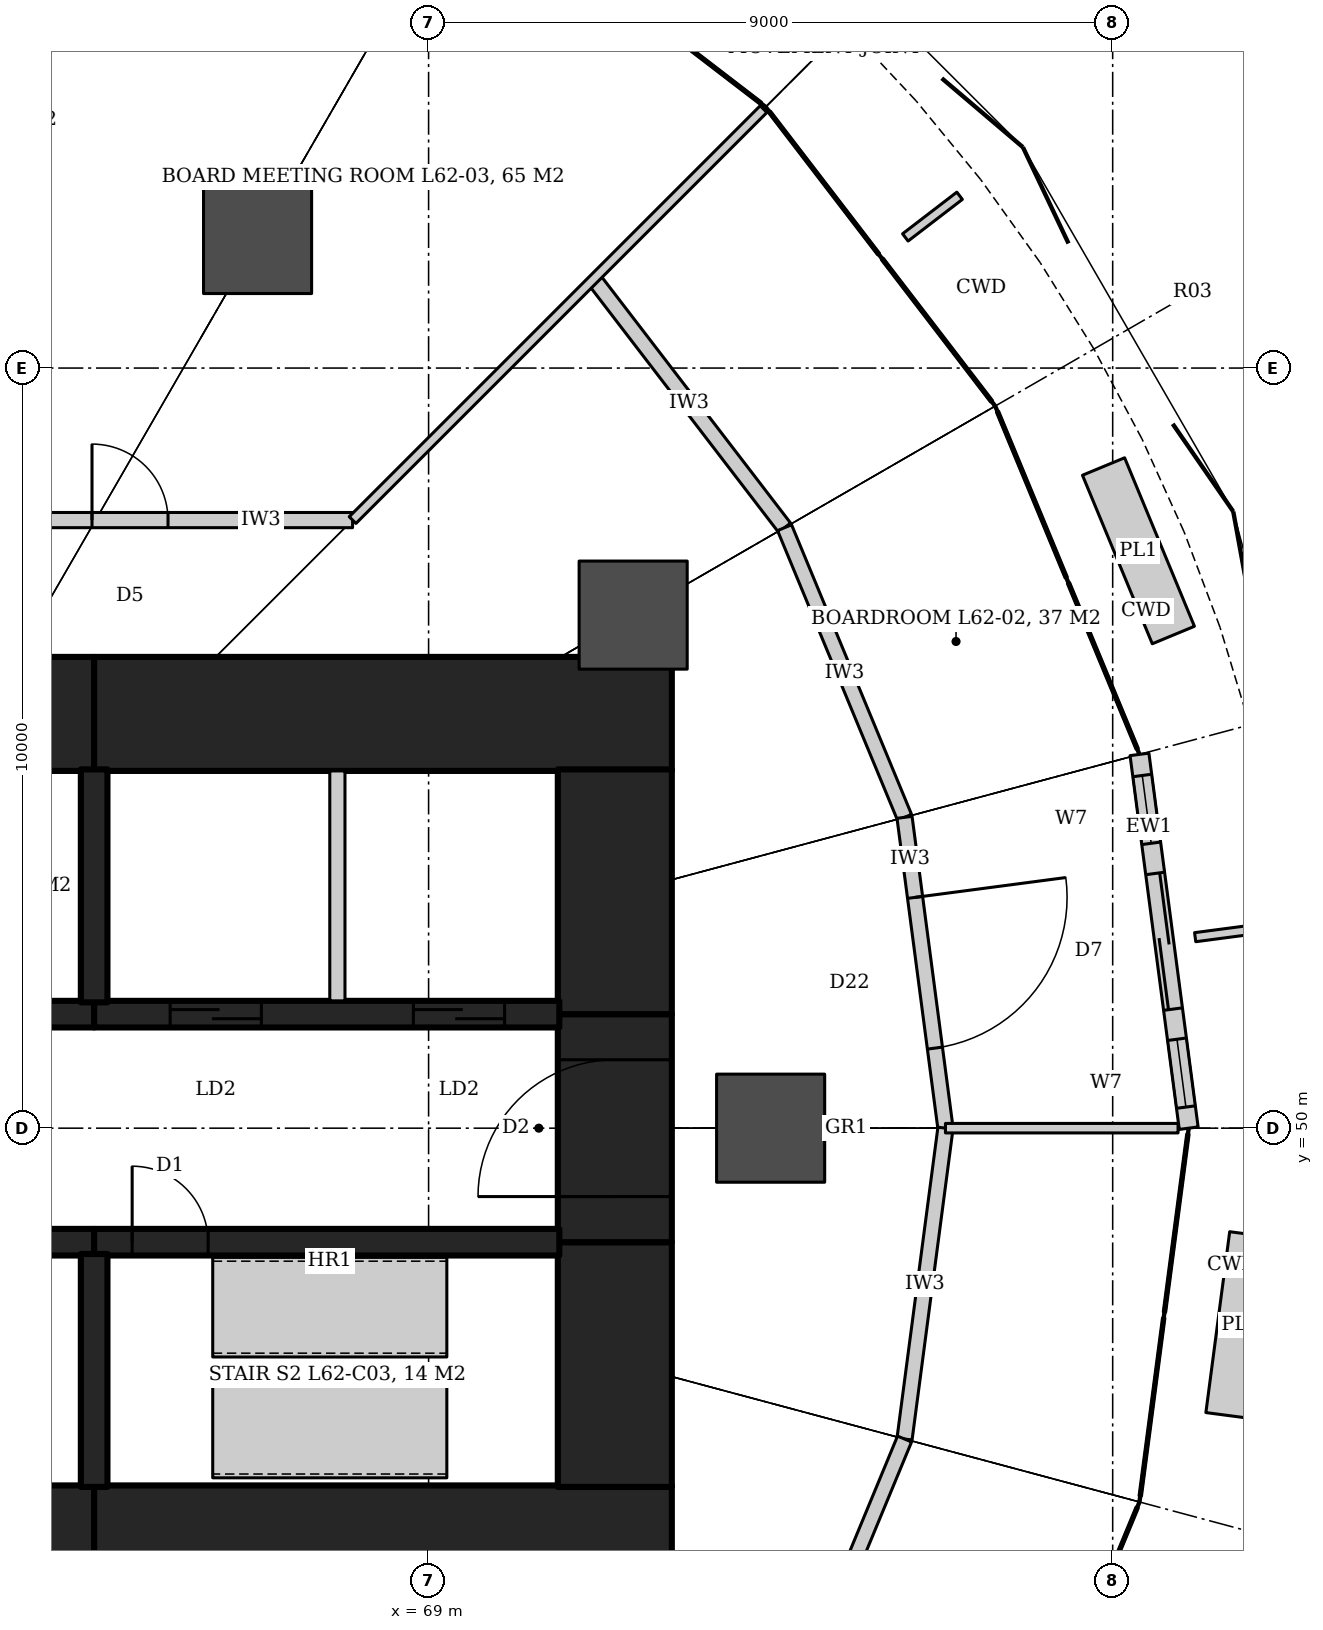
"""IFC4 building model, lengths in metres.
Left out: names, types, materials, properties, quantities, classifications, styles, units other than length and angle.
Written with IfcOpenShell. Run it as: python <this file> out.ifc"""

import sys

from ifc_helpers import new_model, si_unit, direction, frame, frame_2d, origin, origin_2d, place, context, subcontext, project, spatial, rectangle, hollow_circle, extrude, element, fill, save


model = new_model("IFC4")
c1 = context("Model", 3, precision=1e-05, world=origin(), true_north=direction((0.0, 1.0)))
c2 = subcontext(c1, "Body", "Model", "MODEL_VIEW")
j1 = project(units=[si_unit("LENGTHUNIT", "METRE"), si_unit("PLANEANGLEUNIT", "RADIAN")], contexts=[c1])
p1 = place(None, origin())
s1 = spatial("IfcSite", under=j1, at=p1, CompositionType="ELEMENT")
p2 = place(p1, origin())
s2 = spatial("IfcBuilding", under=s1, at=p2, CompositionType="ELEMENT")
p3 = place(p2, frame((0.0, 0.0, 269.6)))
s3 = spatial("IfcBuildingStorey", under=s2, at=p3, CompositionType="ELEMENT", Elevation=269.6)
p4 = place(p3, frame((55.4, 55.45, 0.0), z_axis=(0.0, 0.0, 1.0), x_axis=(1.0, 0.0, 0.0)))
e1 = element("IfcWall", 1, at=p4, inside=s3, PredefinedType="SHEAR", context=c2, shape_type="SweptSolid", body=[
    extrude(rectangle(XDim=9.2, YDim=1.5, at=frame_2d((4.6, 0.0))), origin(), (0.0, 0.0, 1.0), 4.2),
])
p5 = place(p3, frame((64.6, 55.45, 0.0), z_axis=(0.0, 0.0, 1.0), x_axis=(1.0, 0.0, 0.0)))
e2 = element("IfcWall", 2, at=p5, inside=s3, PredefinedType="SHEAR", context=c2, shape_type="SweptSolid", body=[
    extrude(rectangle(XDim=7.6, YDim=1.5, at=frame_2d((3.8, 0.0))), origin(), (0.0, 0.0, 1.0), 4.2),
])
p6 = place(p3, frame((55.4, 44.55, 0.0), z_axis=(0.0, 0.0, 1.0), x_axis=(1.0, 0.0, 0.0)))
e3 = element("IfcWall", 3, at=p6, inside=s3, PredefinedType="SHEAR", context=c2, shape_type="SweptSolid", body=[
    extrude(rectangle(XDim=9.2, YDim=1.5, at=frame_2d((4.6, 0.0))), origin(), (0.0, 0.0, 1.0), 4.2),
])
p7 = place(p3, frame((64.6, 44.55, 0.0), z_axis=(0.0, 0.0, 1.0), x_axis=(1.0, 0.0, 0.0)))
e4 = element("IfcWall", 4, at=p7, inside=s3, PredefinedType="SHEAR", context=c2, shape_type="SweptSolid", body=[
    extrude(rectangle(XDim=7.6, YDim=1.5, at=frame_2d((3.8, 0.0))), origin(), (0.0, 0.0, 1.0), 4.2),
])
p8 = place(p3, frame((71.45, 45.28, 0.0), z_axis=(0.0, 0.0, 1.0), x_axis=(0.0, 1.0, 0.0)))
e5 = element("IfcWall", 5, at=p8, inside=s3, PredefinedType="SHEAR", context=c2, shape_type="SweptSolid", body=[
    extrude(rectangle(XDim=3.22, YDim=1.5, at=frame_2d((1.61, 0.0))), origin(), (0.0, 0.0, 1.0), 4.2),
])
p9 = place(p3, frame((71.45, 48.5, 0.0), z_axis=(0.0, 0.0, 1.0), x_axis=(0.0, 1.0, 0.0)))
e6 = element("IfcWall", 6, at=p9, inside=s3, PredefinedType="SHEAR", context=c2, shape_type="SweptSolid", body=[
    extrude(rectangle(XDim=3.0, YDim=1.5, at=frame_2d((1.5, 0.0))), origin(), (0.0, 0.0, 1.0), 4.2),
])
p10 = place(p9, frame((0.6, 0.0, 0.0)))
e7 = element("IfcOpeningElement", 7, at=p10, cuts=e6, PredefinedType="OPENING", context=c2, shape_type="SweptSolid", body=[
    extrude(rectangle(XDim=1.8, YDim=2.1, at=frame_2d((0.9, 1.05))), frame((0.0, 0.76, 0.0), z_axis=(0.0, -1.0, 0.0), x_axis=(1.0, 0.0, 0.0)), (0.0, 0.0, 1.0), 1.52),
])
p11 = place(p3, frame((71.45, 51.5, 0.0), z_axis=(0.0, 0.0, 1.0), x_axis=(0.0, 1.0, 0.0)))
e8 = element("IfcWall", 8, at=p11, inside=s3, PredefinedType="SHEAR", context=c2, shape_type="SweptSolid", body=[
    extrude(rectangle(XDim=3.22, YDim=1.5, at=frame_2d((1.61, 0.0))), origin(), (0.0, 0.0, 1.0), 4.2),
])
p12 = place(p3, frame((55.4, 51.5, 0.0), z_axis=(0.0, 0.0, 1.0), x_axis=(1.0, 0.0, 0.0)))
e9 = element("IfcWall", 9, at=p12, inside=s3, PredefinedType="SHEAR", context=c2, shape_type="SweptSolid", body=[
    extrude(rectangle(XDim=9.2, YDim=0.35, at=frame_2d((4.6, 0.0))), origin(), (0.0, 0.0, 1.0), 4.2),
])
p13 = place(p12, frame((1.585, 0.0, 0.0)))
e10 = element("IfcOpeningElement", 10, at=p13, cuts=e9, PredefinedType="OPENING", context=c2, shape_type="SweptSolid", body=[
    extrude(rectangle(XDim=0.8, YDim=2.1, at=frame_2d((0.4, 1.05))), frame((0.0, 0.185, 0.0), z_axis=(0.0, -1.0, 0.0), x_axis=(1.0, 0.0, 0.0)), (0.0, 0.0, 1.0), 0.37),
])
p14 = place(p12, frame((4.703, 0.0, 0.0)))
e11 = element("IfcOpeningElement", 11, at=p14, cuts=e9, PredefinedType="OPENING", context=c2, shape_type="SweptSolid", body=[
    extrude(rectangle(XDim=0.8, YDim=2.1, at=frame_2d((0.4, 1.05))), frame((0.0, 0.185, 0.0), z_axis=(0.0, -1.0, 0.0), x_axis=(1.0, 0.0, 0.0)), (0.0, 0.0, 1.0), 0.37),
])
p15 = place(p12, frame((7.318, 0.0, 0.0)))
e12 = element("IfcOpeningElement", 12, at=p15, cuts=e9, PredefinedType="OPENING", context=c2, shape_type="SweptSolid", body=[
    extrude(rectangle(XDim=0.8, YDim=2.1, at=frame_2d((0.4, 1.05))), frame((0.0, 0.185, 0.0), z_axis=(0.0, -1.0, 0.0), x_axis=(1.0, 0.0, 0.0)), (0.0, 0.0, 1.0), 0.37),
])
p16 = place(p3, frame((64.6, 51.5, 0.0), z_axis=(0.0, 0.0, 1.0), x_axis=(1.0, 0.0, 0.0)))
e13 = element("IfcWall", 13, at=p16, inside=s3, PredefinedType="SHEAR", context=c2, shape_type="SweptSolid", body=[
    extrude(rectangle(XDim=6.12, YDim=0.35, at=frame_2d((3.06, 0.0))), origin(), (0.0, 0.0, 1.0), 4.2),
])
p17 = place(p16, frame((1.0, 0.0, 0.0)))
e14 = element("IfcOpeningElement", 14, at=p17, cuts=e13, PredefinedType="OPENING", context=c2, shape_type="SweptSolid", body=[
    extrude(rectangle(XDim=1.2, YDim=2.1, at=frame_2d((0.6, 1.05))), frame((0.0, 0.185, 0.0), z_axis=(0.0, -1.0, 0.0), x_axis=(1.0, 0.0, 0.0)), (0.0, 0.0, 1.0), 0.37),
])
p18 = place(p16, frame((4.2, 0.0, 0.0)))
e15 = element("IfcOpeningElement", 15, at=p18, cuts=e13, PredefinedType="OPENING", context=c2, shape_type="SweptSolid", body=[
    extrude(rectangle(XDim=1.2, YDim=2.1, at=frame_2d((0.6, 1.05))), frame((0.0, 0.185, 0.0), z_axis=(0.0, -1.0, 0.0), x_axis=(1.0, 0.0, 0.0)), (0.0, 0.0, 1.0), 0.37),
])
p19 = place(p3, frame((55.4, 48.5, 0.0), z_axis=(0.0, 0.0, 1.0), x_axis=(1.0, 0.0, 0.0)))
e16 = element("IfcWall", 16, at=p19, inside=s3, PredefinedType="SHEAR", context=c2, shape_type="SweptSolid", body=[
    extrude(rectangle(XDim=9.2, YDim=0.35, at=frame_2d((4.6, 0.0))), origin(), (0.0, 0.0, 1.0), 4.2),
])
p20 = place(p19, frame((0.6, 0.0, 0.0)))
e17 = element("IfcOpeningElement", 17, at=p20, cuts=e16, PredefinedType="OPENING", context=c2, shape_type="SweptSolid", body=[
    extrude(rectangle(XDim=1.1, YDim=2.1, at=frame_2d((0.55, 1.05))), frame((0.0, 0.185, 0.0), z_axis=(0.0, -1.0, 0.0), x_axis=(1.0, 0.0, 0.0)), (0.0, 0.0, 1.0), 0.37),
])
p21 = place(p19, frame((2.9, 0.0, 0.0)))
e18 = element("IfcOpeningElement", 18, at=p21, cuts=e16, PredefinedType="OPENING", context=c2, shape_type="SweptSolid", body=[
    extrude(rectangle(XDim=1.1, YDim=2.1, at=frame_2d((0.55, 1.05))), frame((0.0, 0.185, 0.0), z_axis=(0.0, -1.0, 0.0), x_axis=(1.0, 0.0, 0.0)), (0.0, 0.0, 1.0), 0.37),
])
p22 = place(p19, frame((5.2, 0.0, 0.0)))
e19 = element("IfcOpeningElement", 19, at=p22, cuts=e16, PredefinedType="OPENING", context=c2, shape_type="SweptSolid", body=[
    extrude(rectangle(XDim=1.1, YDim=2.1, at=frame_2d((0.55, 1.05))), frame((0.0, 0.185, 0.0), z_axis=(0.0, -1.0, 0.0), x_axis=(1.0, 0.0, 0.0)), (0.0, 0.0, 1.0), 0.37),
])
p23 = place(p19, frame((7.5, 0.0, 0.0)))
e20 = element("IfcOpeningElement", 20, at=p23, cuts=e16, PredefinedType="OPENING", context=c2, shape_type="SweptSolid", body=[
    extrude(rectangle(XDim=1.1, YDim=2.1, at=frame_2d((0.55, 1.05))), frame((0.0, 0.185, 0.0), z_axis=(0.0, -1.0, 0.0), x_axis=(1.0, 0.0, 0.0)), (0.0, 0.0, 1.0), 0.37),
])
p24 = place(p3, frame((64.6, 48.5, 0.0), z_axis=(0.0, 0.0, 1.0), x_axis=(1.0, 0.0, 0.0)))
e21 = element("IfcWall", 21, at=p24, inside=s3, PredefinedType="SHEAR", context=c2, shape_type="SweptSolid", body=[
    extrude(rectangle(XDim=6.12, YDim=0.35, at=frame_2d((3.06, 0.0))), origin(), (0.0, 0.0, 1.0), 4.2),
])
p25 = place(p24, frame((0.5, 0.0, 0.0)))
e22 = element("IfcOpeningElement", 22, at=p25, cuts=e21, PredefinedType="OPENING", context=c2, shape_type="SweptSolid", body=[
    extrude(rectangle(XDim=1.0, YDim=2.1, at=frame_2d((0.5, 1.05))), frame((0.0, 0.185, 0.0), z_axis=(0.0, -1.0, 0.0), x_axis=(1.0, 0.0, 0.0)), (0.0, 0.0, 1.0), 0.37),
])
for number, where, z_axis, x_axis in (
    (23, (64.6, 51.655, 0.0), (0.0, 0.0, 1.0), (0.0, 1.0, 0.0)),
    (24, (64.6, 48.345, 0.0), (0.0, 0.0, 1.0), (0.0, -1.0, 0.0)),
):
    element("IfcWall", number, at=place(p3, frame(where, z_axis=z_axis, x_axis=x_axis)), inside=s3, PredefinedType="SHEAR", context=c2, shape_type="SweptSolid", body=[
        extrude(rectangle(XDim=3.065, YDim=0.35, at=frame_2d((1.532, 0.0))), origin(), (0.0, 0.0, 1.0), 4.2),
    ])
for number, where, z_axis, x_axis in (
    (25, (73.5, 50.0, 0.0), (0.0, 0.0, 1.0), (1.0, 0.0, 0.0)),
    (26, (71.691, 56.75, 0.0), (0.0, 0.0, 1.0), (1.0, 0.0, 0.0)),
    (27, (66.75, 61.691, 0.0), (0.0, 0.0, 1.0), (1.0, 0.0, 0.0)),
):
    element("IfcColumn", number, at=place(p3, frame(where, z_axis=z_axis, x_axis=x_axis)), inside=s3, PredefinedType="COLUMN", context=c2, shape_type="SweptSolid", body=[
        extrude(hollow_circle(Radius=0.711, WallThickness=0.07, at=origin_2d()), origin(), (0.0, 0.0, 1.0), 4.2),
    ])
p26 = place(p3, frame((62.144, 58.0, 0.0), z_axis=(0.0, 0.0, 1.0), x_axis=(1.0, 0.0, 0.0)))
e28 = element("IfcWall", 28, at=p26, inside=s3, PredefinedType="PARTITIONING", context=c2, shape_type="SweptSolid", body=[
    extrude(rectangle(XDim=5.856, YDim=0.2, at=frame_2d((2.928, 0.0))), origin(), (0.0, 0.0, 1.0), 3.04),
])
p27 = place(p26, frame((2.428, 0.0, 0.0)))
e29 = element("IfcOpeningElement", 29, at=p27, cuts=e28, PredefinedType="OPENING", context=c2, shape_type="SweptSolid", body=[
    extrude(rectangle(XDim=1.0, YDim=2.1, at=frame_2d((0.5, 1.05))), frame((0.0, 0.11, 0.0), z_axis=(0.0, -1.0, 0.0), x_axis=(1.0, 0.0, 0.0)), (0.0, 0.0, 1.0), 0.22),
])
p28 = place(p3, frame((71.172, 61.172, 0.0), z_axis=(0.0, 0.0, 1.0), x_axis=(0.608714823874, -0.793389099494, 0.0)))
e30 = element("IfcWall", 30, at=p28, inside=s3, PredefinedType="PARTITIONING", context=c2, shape_type="SweptSolid", body=[
    extrude(rectangle(XDim=4.125, YDim=0.2, at=frame_2d((2.062, 0.0))), origin(), (0.0, 0.0, 1.0), 3.02),
])
p29 = place(p3, frame((73.683, 57.9, 0.0), z_axis=(0.0, 0.0, 1.0), x_axis=(0.382731667114, -0.923859551549, 0.0)))
e31 = element("IfcWall", 31, at=p29, inside=s3, PredefinedType="PARTITIONING", context=c2, shape_type="SweptSolid", body=[
    extrude(rectangle(XDim=4.125, YDim=0.2, at=frame_2d((2.062, 0.0))), origin(), (0.0, 0.0, 1.0), 3.02),
])
p30 = place(p3, frame((75.262, 54.089, 0.0), z_axis=(0.0, 0.0, 1.0), x_axis=(0.130515758099, -0.991446234996, 0.0)))
e32 = element("IfcWall", 32, at=p30, inside=s3, PredefinedType="PARTITIONING", context=c2, shape_type="SweptSolid", body=[
    extrude(rectangle(XDim=4.125, YDim=0.2, at=frame_2d((2.062, 0.0))), origin(), (0.0, 0.0, 1.0), 3.02),
])
p31 = place(p30, frame((1.062, 0.0, 0.0)))
e33 = element("IfcOpeningElement", 33, at=p31, cuts=e32, PredefinedType="OPENING", context=c2, shape_type="SweptSolid", body=[
    extrude(rectangle(XDim=2.0, YDim=2.7, at=frame_2d((1.0, 1.35))), frame((0.0, 0.11, 0.0), z_axis=(0.0, -1.0, 0.0), x_axis=(1.0, 0.0, 0.0)), (0.0, 0.0, 1.0), 0.22),
])
p32 = place(p3, frame((75.8, 50.0, 0.0), z_axis=(0.0, 0.0, 1.0), x_axis=(-0.130515758099, -0.991446234996, 0.0)))
e34 = element("IfcWall", 34, at=p32, inside=s3, PredefinedType="PARTITIONING", context=c2, shape_type="SweptSolid", body=[
    extrude(rectangle(XDim=4.125, YDim=0.2, at=frame_2d((2.062, 0.0))), origin(), (0.0, 0.0, 1.0), 3.02),
])
p33 = place(p3, frame((75.262, 45.911, 0.0), z_axis=(0.0, 0.0, 1.0), x_axis=(-0.382731667114, -0.923859551549, 0.0)))
e35 = element("IfcWall", 35, at=p33, inside=s3, PredefinedType="PARTITIONING", context=c2, shape_type="SweptSolid", body=[
    extrude(rectangle(XDim=4.125, YDim=0.2, at=frame_2d((2.062, 0.0))), origin(), (0.0, 0.0, 1.0), 3.02),
])
p34 = place(p3, frame((75.8, 50.0, 0.0), z_axis=(0.0, 0.0, 1.0), x_axis=(1.0, 0.0, 0.0)))
e36 = element("IfcWall", 36, at=p34, inside=s3, PredefinedType="PARTITIONING", context=c2, shape_type="SweptSolid", body=[
    extrude(rectangle(XDim=3.06, YDim=0.125, at=frame_2d((1.53, 0.0))), origin(), (0.0, 0.0, 1.0), 3.02),
])
p35 = place(p3, frame((68.0, 58.0, 0.0), z_axis=(0.0, 0.0, 1.0), x_axis=(0.707106781187, 0.707106781187, 0.0)))
e37 = element("IfcWall", 37, at=p35, inside=s3, PredefinedType="PARTITIONING", context=c2, shape_type="SweptSolid", body=[
    extrude(rectangle(XDim=7.646, YDim=0.125, at=frame_2d((3.823, 0.0))), origin(), (0.0, 0.0, 1.0), 3.02),
])
p36 = place(p3, frame((62.143, 57.998, 0.0), z_axis=(0.0, 0.0, 1.0), x_axis=(0.258814926071, 0.965926929971, 0.0)))
e38 = element("IfcWall", 38, at=p36, inside=s3, PredefinedType="PARTITIONING", context=c2, shape_type="SweptSolid", body=[
    extrude(rectangle(XDim=10.68, YDim=0.2, at=frame_2d((5.34, 0.0))), origin(), (0.0, 0.0, 1.0), 3.02),
])
p37 = place(p3, frame((79.0, 50.0, 0.0), z_axis=(0.0, 0.0, 1.0), x_axis=(-0.130538549191, 0.991443234469, 0.0)))
e39 = element("IfcWall", 39, at=p37, inside=s3, PredefinedType="SOLIDWALL", context=c2, shape_type="SweptSolid", body=[
    extrude(rectangle(XDim=4.96, YDim=0.25, at=frame_2d((2.48, 0.0))), origin(), (0.0, 0.0, 1.0), 4.04),
])
p38 = place(p37, frame((1.58, 0.0, 0.0)))
e40 = element("IfcOpeningElement", 40, at=p38, cuts=e39, PredefinedType="OPENING", context=c2, shape_type="SweptSolid", body=[
    extrude(rectangle(XDim=1.8, YDim=2.4, at=frame_2d((0.9, 1.2))), frame((0.0, 0.135, 0.0), z_axis=(0.0, -1.0, 0.0), x_axis=(1.0, 0.0, 0.0)), (0.0, 0.0, 1.0), 0.27),
])
p39 = place(p37, frame((0.28, 0.0, 0.0)))
e41 = element("IfcOpeningElement", 41, at=p39, cuts=e39, PredefinedType="OPENING", context=c2, shape_type="SweptSolid", body=[
    extrude(rectangle(XDim=0.9, YDim=2.4, at=frame_2d((0.45, 1.2))), frame((0.0, 0.135, 0.0), z_axis=(0.0, -1.0, 0.0), x_axis=(1.0, 0.0, 0.0)), (0.0, 0.0, 1.0), 0.27),
])
p40 = place(p37, frame((3.78, 0.0, 0.0)))
e42 = element("IfcOpeningElement", 42, at=p40, cuts=e39, PredefinedType="OPENING", context=c2, shape_type="SweptSolid", body=[
    extrude(rectangle(XDim=0.9, YDim=2.4, at=frame_2d((0.45, 1.2))), frame((0.0, 0.135, 0.0), z_axis=(0.0, -1.0, 0.0), x_axis=(1.0, 0.0, 0.0)), (0.0, 0.0, 1.0), 0.27),
])
p41 = place(p3, frame((67.8, 51.675, 0.0), z_axis=(0.0, 0.0, 1.0), x_axis=(0.0, 1.0, 0.0)))
e43 = element("IfcWall", 43, at=p41, inside=s3, PredefinedType="PARTITIONING", context=c2, shape_type="SweptSolid", body=[
    extrude(rectangle(XDim=3.025, YDim=0.2, at=frame_2d((1.512, 0.0))), origin(), (0.0, 0.0, 1.0), 4.2),
])
p42 = place(p31, origin())
e44 = element("IfcDoor", 44, at=p42, inside=s3, OperationType="DOUBLE_DOOR_DOUBLE_SWING", PredefinedType="DOOR", context=c2, shape_type="SweptSolid", body=[
    extrude(rectangle(XDim=2.0, YDim=2.7, at=frame_2d((1.0, 1.35))), frame((0.0, 0.025, 0.0), z_axis=(0.0, -1.0, 0.0), x_axis=(1.0, 0.0, 0.0)), (0.0, 0.0, 1.0), 0.05),
])
fill(e33, e44)
p43 = place(p27, origin())
e45 = element("IfcDoor", 45, at=p43, inside=s3, OperationType="SINGLE_SWING_LEFT", PredefinedType="DOOR", context=c2, shape_type="SweptSolid", body=[
    extrude(rectangle(XDim=1.0, YDim=2.1, at=frame_2d((0.5, 1.05))), frame((0.0, 0.025, 0.0), z_axis=(0.0, -1.0, 0.0), x_axis=(1.0, 0.0, 0.0)), (0.0, 0.0, 1.0), 0.05),
])
fill(e29, e45)
p44 = place(p38, origin())
e46 = element("IfcDoor", 46, at=p44, inside=s3, OperationType="DOUBLE_DOOR_SLIDING", PredefinedType="DOOR", context=c2, shape_type="SweptSolid", body=[
    extrude(rectangle(XDim=1.8, YDim=2.4, at=frame_2d((0.9, 1.2))), frame((0.0, 0.025, 0.0), z_axis=(0.0, -1.0, 0.0), x_axis=(1.0, 0.0, 0.0)), (0.0, 0.0, 1.0), 0.05),
])
fill(e40, e46)
p45 = place(p39, origin())
e47 = element("IfcWindow", 47, at=p45, inside=s3, PartitioningType="SINGLE_PANEL", PredefinedType="WINDOW", context=c2, shape_type="SweptSolid", body=[
    extrude(rectangle(XDim=0.9, YDim=2.4, at=frame_2d((0.45, 1.2))), frame((0.0, 0.03, 0.0), z_axis=(0.0, -1.0, 0.0), x_axis=(1.0, 0.0, 0.0)), (0.0, 0.0, 1.0), 0.06),
])
fill(e41, e47)
p46 = place(p40, origin())
e48 = element("IfcWindow", 48, at=p46, inside=s3, PartitioningType="SINGLE_PANEL", PredefinedType="WINDOW", context=c2, shape_type="SweptSolid", body=[
    extrude(rectangle(XDim=0.9, YDim=2.4, at=frame_2d((0.45, 1.2))), frame((0.0, 0.03, 0.0), z_axis=(0.0, -1.0, 0.0), x_axis=(1.0, 0.0, 0.0)), (0.0, 0.0, 1.0), 0.06),
])
fill(e42, e48)
p47 = place(p25, origin())
e49 = element("IfcDoor", 49, at=p47, inside=s3, OperationType="SINGLE_SWING_LEFT", PredefinedType="DOOR", context=c2, shape_type="SweptSolid", body=[
    extrude(rectangle(XDim=1.0, YDim=2.1, at=frame_2d((0.5, 1.05))), frame((0.0, 0.025, 0.0), z_axis=(0.0, -1.0, 0.0), x_axis=(1.0, 0.0, 0.0)), (0.0, 0.0, 1.0), 0.05),
])
fill(e22, e49)
p48 = place(p17, origin())
e50 = element("IfcDoor", 50, at=p48, inside=s3, OperationType="SLIDING_TO_LEFT", PredefinedType="DOOR", context=c2, shape_type="SweptSolid", body=[
    extrude(rectangle(XDim=1.2, YDim=2.1, at=frame_2d((0.6, 1.05))), frame((0.0, 0.025, 0.0), z_axis=(0.0, -1.0, 0.0), x_axis=(1.0, 0.0, 0.0)), (0.0, 0.0, 1.0), 0.05),
])
fill(e14, e50)
p49 = place(p18, origin())
e51 = element("IfcDoor", 51, at=p49, inside=s3, OperationType="SLIDING_TO_LEFT", PredefinedType="DOOR", context=c2, shape_type="SweptSolid", body=[
    extrude(rectangle(XDim=1.2, YDim=2.1, at=frame_2d((0.6, 1.05))), frame((0.0, 0.025, 0.0), z_axis=(0.0, -1.0, 0.0), x_axis=(1.0, 0.0, 0.0)), (0.0, 0.0, 1.0), 0.05),
])
fill(e15, e51)
p50 = place(p10, origin())
e52 = element("IfcDoor", 52, at=p50, inside=s3, OperationType="DOUBLE_DOOR_DOUBLE_SWING", PredefinedType="DOOR", context=c2, shape_type="SweptSolid", body=[
    extrude(rectangle(XDim=1.8, YDim=2.1, at=frame_2d((0.9, 1.05))), frame((0.0, 0.025, 0.0), z_axis=(0.0, -1.0, 0.0), x_axis=(1.0, 0.0, 0.0)), (0.0, 0.0, 1.0), 0.05),
])
fill(e7, e52)
save(model, sys.argv[1])
